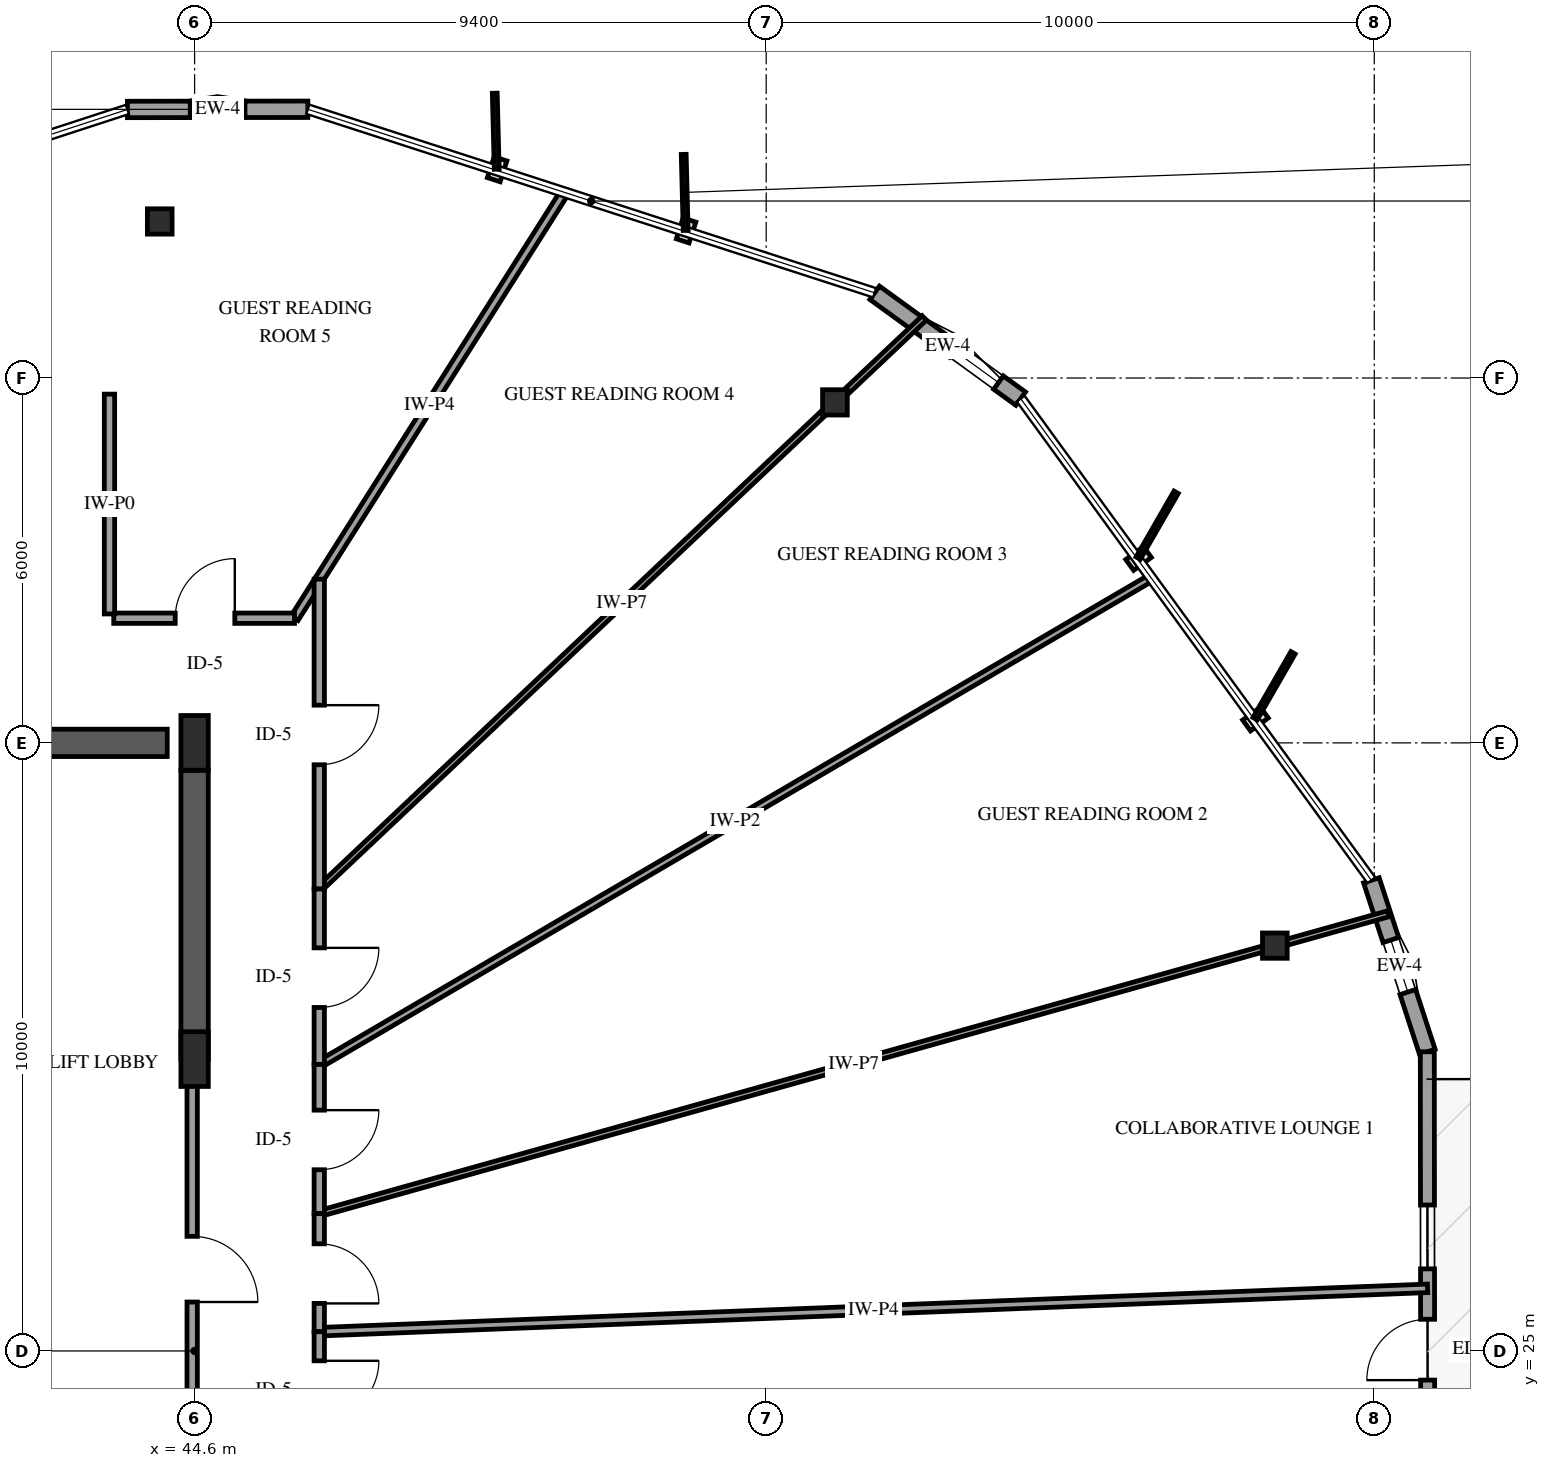
"""IFC4 building model, lengths in metres.
Left out: names, types, materials, properties, quantities, classifications, styles, units other than length and angle.
Written with IfcOpenShell. Run it as: python <this file> out.ifc"""

import sys

from ifc_helpers import new_model, si_unit, direction, frame, frame_2d, origin, origin_2d, place, context, subcontext, project, spatial, rectangle, i_section, extrude, element, fill, save


model = new_model("IFC4")
c1 = context("Model", 3, precision=1e-05, world=origin(), true_north=direction((0.0, 1.0)))
c2 = subcontext(c1, "Body", "Model", "MODEL_VIEW")
j1 = project(units=[si_unit("LENGTHUNIT", "METRE"), si_unit("PLANEANGLEUNIT", "RADIAN")], contexts=[c1])
p1 = place(None, origin())
s1 = spatial("IfcSite", under=j1, at=p1, CompositionType="ELEMENT")
p2 = place(p1, origin())
s2 = spatial("IfcBuilding", under=s1, at=p2, CompositionType="ELEMENT")
p3 = place(p2, frame((0.0, 0.0, 230.2)))
s3 = spatial("IfcBuildingStorey", under=s2, at=p3, CompositionType="ELEMENT", Elevation=230.2)
p4 = place(p3, frame((41.3, 35.0, 0.0), z_axis=(0.0, 0.0, 1.0), x_axis=(1.0, 0.0, 0.0)))
e1 = element("IfcWall", 1, at=p4, inside=s3, PredefinedType="SHEAR", context=c2, shape_type="SweptSolid", body=[
    extrude(rectangle(XDim=2.85, YDim=0.45, at=frame_2d((1.425, 0.0))), origin(), (0.0, 0.0, 1.0), 3.6),
])
p5 = place(p3, frame((44.6, 29.8, 0.0), z_axis=(0.0, 0.0, 1.0), x_axis=(0.0, 1.0, 0.0)))
e2 = element("IfcWall", 2, at=p5, inside=s3, PredefinedType="SHEAR", context=c2, shape_type="SweptSolid", body=[
    extrude(rectangle(XDim=4.75, YDim=0.45, at=frame_2d((2.375, 0.0))), origin(), (0.0, 0.0, 1.0), 3.6),
])
for number, where, z_axis, x_axis in (
    (3, (44.6, 29.8, 0.0), (0.0, 0.0, 1.0), (1.0, 0.0, 0.0)),
    (4, (44.6, 35.0, 0.0), (0.0, 0.0, 1.0), (1.0, 0.0, 0.0)),
):
    element("IfcColumn", number, at=place(p3, frame(where, z_axis=z_axis, x_axis=x_axis)), inside=s3, PredefinedType="PILASTER", context=c2, shape_type="SweptSolid", body=[
        extrude(rectangle(XDim=0.45, YDim=0.9, at=origin_2d()), origin(), (0.0, 0.0, 1.0), 3.6),
    ])
for number, where, z_axis, x_axis in (
    (5, (62.365, 31.666, 0.0), (0.0, 0.0, 1.0), (1.0, 0.0, 0.0)),
    (6, (55.13, 40.599, 0.0), (0.0, 0.0, 1.0), (1.0, 0.0, 0.0)),
    (7, (44.027, 43.574, 0.0), (0.0, 0.0, 1.0), (1.0, 0.0, 0.0)),
):
    element("IfcColumn", number, at=place(p3, frame(where, z_axis=z_axis, x_axis=x_axis)), inside=s3, PredefinedType="COLUMN", context=c2, shape_type="SweptSolid", body=[
        extrude(i_section(OverallWidth=0.406, OverallDepth=0.416, WebThickness=0.03, FlangeThickness=0.048, FilletRadius=0.038, at=origin_2d()), origin(), (0.0, 0.0, 1.0), 3.6),
    ])
p6 = place(p3, frame((46.462, 45.42, 0.0), z_axis=(0.0, 0.0, 1.0), x_axis=(-0.999999427689, -0.00106987018, 0.0)))
e8 = element("IfcWall", 8, at=p6, inside=s3, PredefinedType="SOLIDWALL", context=c2, shape_type="SweptSolid", body=[
    extrude(rectangle(XDim=2.967, YDim=0.27, at=frame_2d((1.483, 0.0))), origin(), (0.0, 0.0, 1.0), 2.679),
])
p7 = place(p6, frame((1.033, 0.0, 0.75)))
e9 = element("IfcOpeningElement", 9, at=p7, cuts=e8, PredefinedType="OPENING", context=c2, shape_type="SweptSolid", body=[
    extrude(rectangle(XDim=0.9, YDim=1.5, at=frame_2d((0.45, 0.75))), frame((0.0, 0.145, 0.0), z_axis=(0.0, -1.0, 0.0), x_axis=(1.0, 0.0, 0.0)), (0.0, 0.0, 1.0), 0.29),
])
p8 = place(p3, frame((64.872, 29.92, 0.0), z_axis=(0.0, 0.0, 1.0), x_axis=(-0.309949441634, 0.950753040295, 0.0)))
e10 = element("IfcWall", 10, at=p8, inside=s3, PredefinedType="SOLIDWALL", context=c2, shape_type="SweptSolid", body=[
    extrude(rectangle(XDim=2.966, YDim=0.27, at=frame_2d((1.483, 0.0))), origin(), (0.0, 0.0, 1.0), 2.679),
])
p9 = place(p8, frame((1.033, 0.0, 0.75)))
e11 = element("IfcOpeningElement", 11, at=p9, cuts=e10, PredefinedType="OPENING", context=c2, shape_type="SweptSolid", body=[
    extrude(rectangle(XDim=0.9, YDim=1.5, at=frame_2d((0.45, 0.75))), frame((0.0, 0.145, 0.0), z_axis=(0.0, -1.0, 0.0), x_axis=(1.0, 0.0, 0.0)), (0.0, 0.0, 1.0), 0.29),
])
p10 = place(p3, frame((64.882, 20.122, 0.0), z_axis=(0.0, 0.0, 1.0), x_axis=(-0.001046571902, 0.999999452343, 0.0)))
e12 = element("IfcWall", 12, at=p10, inside=s3, PredefinedType="SOLIDWALL", context=c2, shape_type="SweptSolid", body=[
    extrude(rectangle(XDim=9.798, YDim=0.23, at=frame_2d((4.899, 0.0))), origin(), (0.0, 0.0, 1.0), 2.679),
])
p11 = place(p10, frame((4.399, 0.0, 0.0)))
e13 = element("IfcOpeningElement", 13, at=p11, cuts=e12, PredefinedType="OPENING", context=c2, shape_type="SweptSolid", body=[
    extrude(rectangle(XDim=1.0, YDim=2.15, at=frame_2d((0.5, 1.075))), frame((0.0, 0.125, 0.0), z_axis=(0.0, -1.0, 0.0), x_axis=(1.0, 0.0, 0.0)), (0.0, 0.0, 1.0), 0.25),
])
p12 = place(p10, frame((0.44, 0.0, 0.72)))
e14 = element("IfcOpeningElement", 14, at=p12, cuts=e12, PredefinedType="OPENING", context=c2, shape_type="SweptSolid", body=[
    extrude(rectangle(XDim=1.05, YDim=1.55, at=frame_2d((0.525, 0.775))), frame((0.0, 0.125, 0.0), z_axis=(0.0, -1.0, 0.0), x_axis=(1.0, 0.0, 0.0)), (0.0, 0.0, 1.0), 0.25),
])
p13 = place(p10, frame((6.228, 0.0, 0.72)))
e15 = element("IfcOpeningElement", 15, at=p13, cuts=e12, PredefinedType="OPENING", context=c2, shape_type="SweptSolid", body=[
    extrude(rectangle(XDim=1.05, YDim=1.55, at=frame_2d((0.525, 0.775))), frame((0.0, 0.125, 0.0), z_axis=(0.0, -1.0, 0.0), x_axis=(1.0, 0.0, 0.0)), (0.0, 0.0, 1.0), 0.25),
])
p14 = place(p3, frame((58.185, 40.66, 0.0), z_axis=(0.0, 0.0, 1.0), x_axis=(-0.809631952519, 0.586937902558, 0.0)))
e16 = element("IfcWall", 16, at=p14, inside=s3, PredefinedType="SOLIDWALL", context=c2, shape_type="SweptSolid", body=[
    extrude(rectangle(XDim=2.967, YDim=0.27, at=frame_2d((1.483, 0.0))), origin(), (0.0, 0.0, 1.0), 2.679),
])
p15 = place(p14, frame((0.45, 0.0, 0.75)))
e17 = element("IfcOpeningElement", 17, at=p15, cuts=e16, PredefinedType="OPENING", context=c2, shape_type="SweptSolid", body=[
    extrude(rectangle(XDim=0.9, YDim=1.5, at=frame_2d((0.45, 0.75))), frame((0.0, 0.145, 0.0), z_axis=(0.0, -1.0, 0.0), x_axis=(1.0, 0.0, 0.0)), (0.0, 0.0, 1.0), 0.29),
])
p16 = place(p3, frame((46.65, 27.258, 0.0), z_axis=(0.0, 0.0, 1.0), x_axis=(0.962841039235, 0.270068756367, 0.0)))
e18 = element("IfcWall", 18, at=p16, inside=s3, PredefinedType="PARTITIONING", context=c2, shape_type="SweptSolid", body=[
    extrude(rectangle(XDim=18.261, YDim=0.1, at=frame_2d((9.131, 0.0))), origin(), (0.0, 0.0, 1.0), 2.674),
])
p17 = place(p3, frame((64.876, 26.03, 0.0), z_axis=(0.0, 0.0, 1.0), x_axis=(-0.999233316869, -0.039150714655, 0.0)))
e19 = element("IfcWall", 19, at=p17, inside=s3, PredefinedType="PARTITIONING", context=c2, shape_type="SweptSolid", body=[
    extrude(rectangle(XDim=18.24, YDim=0.14, at=frame_2d((9.12, 0.0))), origin(), (0.0, 0.0, 1.0), 3.3),
])
p18 = place(p3, frame((46.65, 29.711, 0.0), z_axis=(0.0, 0.0, 1.0), x_axis=(0.863117805334, 0.505002627831, 0.0)))
e20 = element("IfcWall", 20, at=p18, inside=s3, PredefinedType="PARTITIONING", context=c2, shape_type="SweptSolid", body=[
    extrude(rectangle(XDim=15.85, YDim=0.12, at=frame_2d((7.925, 0.0))), origin(), (0.0, 0.0, 1.0), 3.3),
])
p19 = place(p3, frame((46.65, 32.597, 0.0), z_axis=(0.0, 0.0, 1.0), x_axis=(0.727278352546, 0.686342624291, 0.0)))
e21 = element("IfcWall", 21, at=p19, inside=s3, PredefinedType="PARTITIONING", context=c2, shape_type="SweptSolid", body=[
    extrude(rectangle(XDim=13.681, YDim=0.1, at=frame_2d((6.841, 0.0))), origin(), (0.0, 0.0, 1.0), 2.595),
])
p20 = place(p3, frame((46.243, 37.05, 0.0), z_axis=(0.0, 0.0, 1.0), x_axis=(0.535566095282, 0.844493314115, 0.0)))
e22 = element("IfcWall", 22, at=p20, inside=s3, PredefinedType="PARTITIONING", context=c2, shape_type="SweptSolid", body=[
    extrude(rectangle(XDim=8.292, YDim=0.14, at=frame_2d((4.146, 0.0))), origin(), (0.0, 0.0, 1.0), 2.674),
])
p21 = place(p3, frame((44.56, 29.8, 0.0), z_axis=(0.0, 0.0, 1.0), x_axis=(0.0, -1.0, 0.0)))
e23 = element("IfcWall", 23, at=p21, inside=s3, PredefinedType="PARTITIONING", context=c2, shape_type="SweptSolid", body=[
    extrude(rectangle(XDim=6.91, YDim=0.17, at=frame_2d((3.455, 0.0))), origin(), (0.0, 0.0, 1.0), 2.34),
])
p22 = place(p21, frame((2.915, 0.0, 0.0)))
e24 = element("IfcOpeningElement", 24, at=p22, cuts=e23, PredefinedType="OPENING", context=c2, shape_type="SweptSolid", body=[
    extrude(rectangle(XDim=1.08, YDim=2.15, at=frame_2d((0.54, 1.075))), frame((0.0, 0.095, 0.0), z_axis=(0.0, -1.0, 0.0), x_axis=(1.0, 0.0, 0.0)), (0.0, 0.0, 1.0), 0.19),
])
p23 = place(p3, frame((46.65, 37.692, 0.0), z_axis=(0.0, 0.0, 1.0), x_axis=(0.0, -1.0, 0.0)))
e25 = element("IfcWall", 25, at=p23, inside=s3, PredefinedType="PARTITIONING", context=c2, shape_type="SweptSolid", body=[
    extrude(rectangle(XDim=5.095, YDim=0.17, at=frame_2d((2.547, 0.0))), origin(), (0.0, 0.0, 1.0), 3.3),
])
p24 = place(p23, frame((2.072, 0.0, 0.0)))
e26 = element("IfcOpeningElement", 26, at=p24, cuts=e25, PredefinedType="OPENING", context=c2, shape_type="SweptSolid", body=[
    extrude(rectangle(XDim=0.98, YDim=2.15, at=frame_2d((0.49, 1.075))), frame((0.0, 0.095, 0.0), z_axis=(0.0, -1.0, 0.0), x_axis=(1.0, 0.0, 0.0)), (0.0, 0.0, 1.0), 0.19),
])
p25 = place(p3, frame((43.27, 37.05, 0.0), z_axis=(0.0, 0.0, 1.0), x_axis=(1.0, 0.0, 0.0)))
e27 = element("IfcWall", 27, at=p25, inside=s3, PredefinedType="PARTITIONING", context=c2, shape_type="SweptSolid", body=[
    extrude(rectangle(XDim=2.973, YDim=0.17, at=frame_2d((1.486, 0.0))), origin(), (0.0, 0.0, 1.0), 3.3),
])
p26 = place(p25, frame((1.011, 0.0, 0.0)))
e28 = element("IfcOpeningElement", 28, at=p26, cuts=e27, PredefinedType="OPENING", context=c2, shape_type="SweptSolid", body=[
    extrude(rectangle(XDim=0.98, YDim=2.15, at=frame_2d((0.49, 1.075))), frame((0.0, 0.095, 0.0), z_axis=(0.0, -1.0, 0.0), x_axis=(1.0, 0.0, 0.0)), (0.0, 0.0, 1.0), 0.19),
])
p27 = place(p3, frame((46.65, 32.597, 0.0), z_axis=(0.0, 0.0, 1.0), x_axis=(0.0, -1.0, 0.0)))
e29 = element("IfcWall", 29, at=p27, inside=s3, PredefinedType="PARTITIONING", context=c2, shape_type="SweptSolid", body=[
    extrude(rectangle(XDim=2.886, YDim=0.17, at=frame_2d((1.443, 0.0))), origin(), (0.0, 0.0, 1.0), 3.3),
])
p28 = place(p27, frame((0.968, 0.0, 0.0)))
e30 = element("IfcOpeningElement", 30, at=p28, cuts=e29, PredefinedType="OPENING", context=c2, shape_type="SweptSolid", body=[
    extrude(rectangle(XDim=0.98, YDim=2.15, at=frame_2d((0.49, 1.075))), frame((0.0, 0.095, 0.0), z_axis=(0.0, -1.0, 0.0), x_axis=(1.0, 0.0, 0.0)), (0.0, 0.0, 1.0), 0.19),
])
p29 = place(p3, frame((46.65, 29.711, 0.0), z_axis=(0.0, 0.0, 1.0), x_axis=(0.0, -1.0, 0.0)))
e31 = element("IfcWall", 31, at=p29, inside=s3, PredefinedType="PARTITIONING", context=c2, shape_type="SweptSolid", body=[
    extrude(rectangle(XDim=2.453, YDim=0.17, at=frame_2d((1.227, 0.0))), origin(), (0.0, 0.0, 1.0), 3.3),
])
p30 = place(p29, frame((0.751, 0.0, 0.0)))
e32 = element("IfcOpeningElement", 32, at=p30, cuts=e31, PredefinedType="OPENING", context=c2, shape_type="SweptSolid", body=[
    extrude(rectangle(XDim=0.98, YDim=2.15, at=frame_2d((0.49, 1.075))), frame((0.0, 0.095, 0.0), z_axis=(0.0, -1.0, 0.0), x_axis=(1.0, 0.0, 0.0)), (0.0, 0.0, 1.0), 0.19),
])
p31 = place(p3, frame((46.65, 27.258, 0.0), z_axis=(0.0, 0.0, 1.0), x_axis=(0.0, -1.0, 0.0)))
e33 = element("IfcWall", 33, at=p31, inside=s3, PredefinedType="PARTITIONING", context=c2, shape_type="SweptSolid", body=[
    extrude(rectangle(XDim=1.942, YDim=0.17, at=frame_2d((0.971, 0.0))), origin(), (0.0, 0.0, 1.0), 3.3),
])
p32 = place(p31, frame((0.496, 0.0, 0.0)))
e34 = element("IfcOpeningElement", 34, at=p32, cuts=e33, PredefinedType="OPENING", context=c2, shape_type="SweptSolid", body=[
    extrude(rectangle(XDim=0.98, YDim=2.15, at=frame_2d((0.49, 1.075))), frame((0.0, 0.095, 0.0), z_axis=(0.0, -1.0, 0.0), x_axis=(1.0, 0.0, 0.0)), (0.0, 0.0, 1.0), 0.19),
])
p33 = place(p3, frame((46.65, 25.316, 0.0), z_axis=(0.0, 0.0, 1.0), x_axis=(0.0, -1.0, 0.0)))
e35 = element("IfcWall", 35, at=p33, inside=s3, PredefinedType="PARTITIONING", context=c2, shape_type="SweptSolid", body=[
    extrude(rectangle(XDim=1.906, YDim=0.17, at=frame_2d((0.953, 0.0))), origin(), (0.0, 0.0, 1.0), 3.3),
])
p34 = place(p33, frame((0.478, 0.0, 0.0)))
e36 = element("IfcOpeningElement", 36, at=p34, cuts=e35, PredefinedType="OPENING", context=c2, shape_type="SweptSolid", body=[
    extrude(rectangle(XDim=0.98, YDim=2.15, at=frame_2d((0.49, 1.075))), frame((0.0, 0.095, 0.0), z_axis=(0.0, -1.0, 0.0), x_axis=(1.0, 0.0, 0.0)), (0.0, 0.0, 1.0), 0.19),
])
p35 = place(p3, frame((43.2, 40.735, 0.0), z_axis=(0.0, 0.0, 1.0), x_axis=(0.0, -1.0, 0.0)))
e37 = element("IfcWall", 37, at=p35, inside=s3, PredefinedType="PARTITIONING", context=c2, shape_type="SweptSolid", body=[
    extrude(rectangle(XDim=3.615, YDim=0.17, at=frame_2d((1.808, 0.0))), origin(), (0.0, 0.0, 1.0), 2.595),
])
p36 = place(p7, origin())
e38 = element("IfcWindow", 38, at=p36, inside=s3, PartitioningType="SINGLE_PANEL", PredefinedType="WINDOW", context=c2, shape_type="SweptSolid", body=[
    extrude(rectangle(XDim=0.9, YDim=1.5, at=frame_2d((0.45, 0.75))), frame((0.0, 0.03, 0.0), z_axis=(0.0, -1.0, 0.0), x_axis=(1.0, 0.0, 0.0)), (0.0, 0.0, 1.0), 0.06),
])
fill(e9, e38)
p37 = place(p9, origin())
e39 = element("IfcWindow", 39, at=p37, inside=s3, PartitioningType="SINGLE_PANEL", PredefinedType="WINDOW", context=c2, shape_type="SweptSolid", body=[
    extrude(rectangle(XDim=0.9, YDim=1.5, at=frame_2d((0.45, 0.75))), frame((0.0, 0.03, 0.0), z_axis=(0.0, -1.0, 0.0), x_axis=(1.0, 0.0, 0.0)), (0.0, 0.0, 1.0), 0.06),
])
fill(e11, e39)
p38 = place(p11, origin())
e40 = element("IfcDoor", 40, at=p38, inside=s3, OperationType="SINGLE_SWING_LEFT", PredefinedType="DOOR", context=c2, shape_type="SweptSolid", body=[
    extrude(rectangle(XDim=1.0, YDim=2.15, at=frame_2d((0.5, 1.075))), frame((0.0, 0.025, 0.0), z_axis=(0.0, -1.0, 0.0), x_axis=(1.0, 0.0, 0.0)), (0.0, 0.0, 1.0), 0.05),
])
fill(e13, e40)
p39 = place(p13, origin())
e41 = element("IfcWindow", 41, at=p39, inside=s3, PartitioningType="SINGLE_PANEL", PredefinedType="WINDOW", context=c2, shape_type="SweptSolid", body=[
    extrude(rectangle(XDim=1.05, YDim=1.55, at=frame_2d((0.525, 0.775))), frame((0.0, 0.03, 0.0), z_axis=(0.0, -1.0, 0.0), x_axis=(1.0, 0.0, 0.0)), (0.0, 0.0, 1.0), 0.06),
])
fill(e15, e41)
p40 = place(p15, origin())
e42 = element("IfcWindow", 42, at=p40, inside=s3, PartitioningType="SINGLE_PANEL", PredefinedType="WINDOW", context=c2, shape_type="SweptSolid", body=[
    extrude(rectangle(XDim=0.9, YDim=1.5, at=frame_2d((0.45, 0.75))), frame((0.0, 0.03, 0.0), z_axis=(0.0, -1.0, 0.0), x_axis=(1.0, 0.0, 0.0)), (0.0, 0.0, 1.0), 0.06),
])
fill(e17, e42)
p41 = place(p22, origin())
e43 = element("IfcDoor", 43, at=p41, inside=s3, OperationType="SINGLE_SWING_RIGHT", PredefinedType="DOOR", context=c2, shape_type="SweptSolid", body=[
    extrude(rectangle(XDim=1.08, YDim=2.15, at=frame_2d((0.54, 1.075))), frame((0.0, 0.025, 0.0), z_axis=(0.0, -1.0, 0.0), x_axis=(1.0, 0.0, 0.0)), (0.0, 0.0, 1.0), 0.05),
])
fill(e24, e43)
p42 = place(p24, origin())
e44 = element("IfcDoor", 44, at=p42, inside=s3, OperationType="SINGLE_SWING_LEFT", PredefinedType="DOOR", context=c2, shape_type="SweptSolid", body=[
    extrude(rectangle(XDim=0.98, YDim=2.15, at=frame_2d((0.49, 1.075))), frame((0.0, 0.025, 0.0), z_axis=(0.0, -1.0, 0.0), x_axis=(1.0, 0.0, 0.0)), (0.0, 0.0, 1.0), 0.05),
])
fill(e26, e44)
p43 = place(p26, origin())
e45 = element("IfcDoor", 45, at=p43, inside=s3, OperationType="SINGLE_SWING_RIGHT", PredefinedType="DOOR", context=c2, shape_type="SweptSolid", body=[
    extrude(rectangle(XDim=0.98, YDim=2.15, at=frame_2d((0.49, 1.075))), frame((0.0, 0.025, 0.0), z_axis=(0.0, -1.0, 0.0), x_axis=(1.0, 0.0, 0.0)), (0.0, 0.0, 1.0), 0.05),
])
fill(e28, e45)
p44 = place(p28, origin())
e46 = element("IfcDoor", 46, at=p44, inside=s3, OperationType="SINGLE_SWING_LEFT", PredefinedType="DOOR", context=c2, shape_type="SweptSolid", body=[
    extrude(rectangle(XDim=0.98, YDim=2.15, at=frame_2d((0.49, 1.075))), frame((0.0, 0.025, 0.0), z_axis=(0.0, -1.0, 0.0), x_axis=(1.0, 0.0, 0.0)), (0.0, 0.0, 1.0), 0.05),
])
fill(e30, e46)
p45 = place(p30, origin())
e47 = element("IfcDoor", 47, at=p45, inside=s3, OperationType="SINGLE_SWING_LEFT", PredefinedType="DOOR", context=c2, shape_type="SweptSolid", body=[
    extrude(rectangle(XDim=0.98, YDim=2.15, at=frame_2d((0.49, 1.075))), frame((0.0, 0.025, 0.0), z_axis=(0.0, -1.0, 0.0), x_axis=(1.0, 0.0, 0.0)), (0.0, 0.0, 1.0), 0.05),
])
fill(e32, e47)
p46 = place(p32, origin())
e48 = element("IfcDoor", 48, at=p46, inside=s3, OperationType="SINGLE_SWING_RIGHT", PredefinedType="DOOR", context=c2, shape_type="SweptSolid", body=[
    extrude(rectangle(XDim=0.98, YDim=2.15, at=frame_2d((0.49, 1.075))), frame((0.0, 0.025, 0.0), z_axis=(0.0, -1.0, 0.0), x_axis=(1.0, 0.0, 0.0)), (0.0, 0.0, 1.0), 0.05),
])
fill(e34, e48)
p47 = place(p34, origin())
e49 = element("IfcDoor", 49, at=p47, inside=s3, OperationType="SINGLE_SWING_LEFT", PredefinedType="DOOR", context=c2, shape_type="SweptSolid", body=[
    extrude(rectangle(XDim=0.98, YDim=2.15, at=frame_2d((0.49, 1.075))), frame((0.0, 0.025, 0.0), z_axis=(0.0, -1.0, 0.0), x_axis=(1.0, 0.0, 0.0)), (0.0, 0.0, 1.0), 0.05),
])
fill(e36, e49)
save(model, sys.argv[1])
